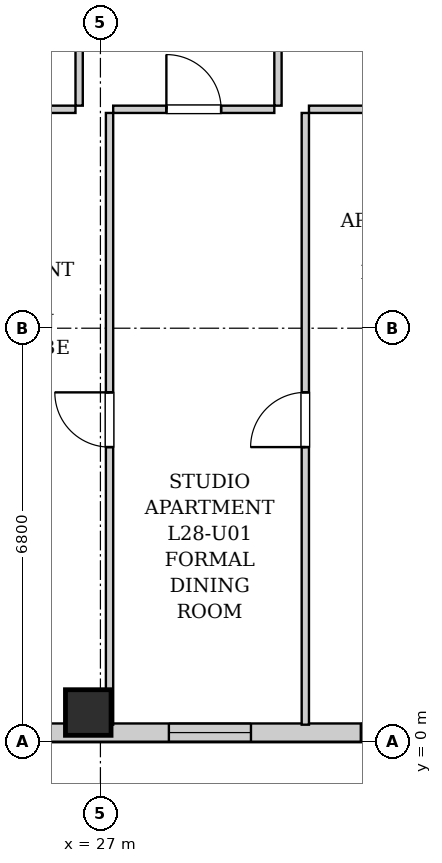
"""IFC4 building model, lengths in metres.
Left out: names, types, materials, properties, quantities, classifications, styles, units other than length and angle.
Written with IfcOpenShell. Run it as: python <this file> out.ifc"""

import sys

from ifc_helpers import new_model, si_unit, direction, frame, frame_2d, origin, origin_2d, place, context, subcontext, project, spatial, rectangle, extrude, element, fill, save


model = new_model("IFC4")
c1 = context("Model", 3, precision=1e-05, world=origin(), true_north=direction((0.0, 1.0)))
c2 = subcontext(c1, "Body", "Model", "MODEL_VIEW")
j1 = project(units=[si_unit("LENGTHUNIT", "METRE"), si_unit("PLANEANGLEUNIT", "RADIAN")], contexts=[c1])
p1 = place(None, origin())
s1 = spatial("IfcSite", under=j1, at=p1, CompositionType="ELEMENT")
p2 = place(p1, origin())
s2 = spatial("IfcBuilding", under=s1, at=p2, CompositionType="ELEMENT")
p3 = place(p2, frame((0.0, 0.0, 100.7)))
s3 = spatial("IfcBuildingStorey", under=s2, at=p3, CompositionType="ELEMENT", Elevation=100.7)
p4 = place(p3, frame((26.8, 0.48, 0.0), z_axis=(0.0, 0.0, 1.0), x_axis=(1.0, 0.0, 0.0)))
e1 = element("IfcColumn", 1, at=p4, inside=s3, PredefinedType="COLUMN", context=c2, shape_type="SweptSolid", body=[
    extrude(rectangle(XDim=0.75, YDim=0.75, at=origin_2d()), origin(), (0.0, 0.0, 1.0), 3.2),
])
p5 = place(p3, frame((40.9, 0.15, 0.0), z_axis=(0.0, 0.0, 1.0), x_axis=(-1.0, 0.0, 0.0)))
e2 = element("IfcWall", 2, at=p5, inside=s3, PredefinedType="SOLIDWALL", context=c2, shape_type="SweptSolid", body=[
    extrude(rectangle(XDim=24.35, YDim=0.3, at=frame_2d((12.175, 0.0))), origin(), (0.0, 0.0, 1.0), 2.94),
])
p6 = place(p5, frame((21.119, 0.0, 0.55)))
e3 = element("IfcOpeningElement", 3, at=p6, cuts=e2, PredefinedType="OPENING", context=c2, shape_type="SweptSolid", body=[
    extrude(rectangle(XDim=1.35, YDim=1.2, at=frame_2d((0.675, 0.6))), frame((0.0, 0.16, 0.0), z_axis=(0.0, -1.0, 0.0), x_axis=(1.0, 0.0, 0.0)), (0.0, 0.0, 1.0), 0.32),
])
p7 = place(p5, frame((18.4, 0.0, 0.55)))
e4 = element("IfcOpeningElement", 4, at=p7, cuts=e2, PredefinedType="OPENING", context=c2, shape_type="SweptSolid", body=[
    extrude(rectangle(XDim=1.35, YDim=1.2, at=frame_2d((0.675, 0.6))), frame((0.0, 0.16, 0.0), z_axis=(0.0, -1.0, 0.0), x_axis=(1.0, 0.0, 0.0)), (0.0, 0.0, 1.0), 0.32),
])
p8 = place(p5, frame((11.424, 0.0, 0.55)))
e5 = element("IfcOpeningElement", 5, at=p8, cuts=e2, PredefinedType="OPENING", context=c2, shape_type="SweptSolid", body=[
    extrude(rectangle(XDim=1.35, YDim=1.2, at=frame_2d((0.675, 0.6))), frame((0.0, 0.16, 0.0), z_axis=(0.0, -1.0, 0.0), x_axis=(1.0, 0.0, 0.0)), (0.0, 0.0, 1.0), 0.32),
])
p9 = place(p5, frame((8.268, 0.0, 0.55)))
e6 = element("IfcOpeningElement", 6, at=p9, cuts=e2, PredefinedType="OPENING", context=c2, shape_type="SweptSolid", body=[
    extrude(rectangle(XDim=1.35, YDim=1.2, at=frame_2d((0.675, 0.6))), frame((0.0, 0.16, 0.0), z_axis=(0.0, -1.0, 0.0), x_axis=(1.0, 0.0, 0.0)), (0.0, 0.0, 1.0), 0.32),
])
p10 = place(p5, frame((5.037, 0.0, 0.55)))
e7 = element("IfcOpeningElement", 7, at=p10, cuts=e2, PredefinedType="OPENING", context=c2, shape_type="SweptSolid", body=[
    extrude(rectangle(XDim=1.35, YDim=1.2, at=frame_2d((0.675, 0.6))), frame((0.0, 0.16, 0.0), z_axis=(0.0, -1.0, 0.0), x_axis=(1.0, 0.0, 0.0)), (0.0, 0.0, 1.0), 0.32),
])
p11 = place(p3, frame((26.65, 10.46, 0.0), z_axis=(0.0, 0.0, 1.0), x_axis=(0.0, 1.0, 0.0)))
e8 = element("IfcWall", 8, at=p11, inside=s3, PredefinedType="PARTITIONING", context=c2, shape_type="SweptSolid", body=[
    extrude(rectangle(XDim=2.85, YDim=0.12, at=frame_2d((1.425, 0.0))), origin(), (0.0, 0.0, 1.0), 2.94),
])
p12 = place(p11, frame((0.975, 0.0, 0.0)))
e9 = element("IfcOpeningElement", 9, at=p12, cuts=e8, PredefinedType="OPENING", context=c2, shape_type="SweptSolid", body=[
    extrude(rectangle(XDim=0.9, YDim=2.05, at=frame_2d((0.45, 1.025))), frame((0.0, 0.07, 0.0), z_axis=(0.0, -1.0, 0.0), x_axis=(1.0, 0.0, 0.0)), (0.0, 0.0, 1.0), 0.14),
])
p13 = place(p3, frame((23.99, 10.4, 0.0), z_axis=(0.0, 0.0, 1.0), x_axis=(1.0, 0.0, 0.0)))
e10 = element("IfcWall", 10, at=p13, inside=s3, PredefinedType="PARTITIONING", context=c2, shape_type="SweptSolid", body=[
    extrude(rectangle(XDim=2.6, YDim=0.12, at=frame_2d((1.3, 0.0))), origin(), (0.0, 0.0, 1.0), 2.94),
])
p14 = place(p13, frame((0.85, 0.0, 0.0)))
e11 = element("IfcOpeningElement", 11, at=p14, cuts=e10, PredefinedType="OPENING", context=c2, shape_type="SweptSolid", body=[
    extrude(rectangle(XDim=0.9, YDim=2.05, at=frame_2d((0.45, 1.025))), frame((0.0, 0.07, 0.0), z_axis=(0.0, -1.0, 0.0), x_axis=(1.0, 0.0, 0.0)), (0.0, 0.0, 1.0), 0.14),
])
p15 = place(p3, frame((29.92, 10.46, 0.0), z_axis=(0.0, 0.0, 1.0), x_axis=(0.0, 1.0, 0.0)))
e12 = element("IfcWall", 12, at=p15, inside=s3, PredefinedType="PARTITIONING", context=c2, shape_type="SweptSolid", body=[
    extrude(rectangle(XDim=2.85, YDim=0.12, at=frame_2d((1.425, 0.0))), origin(), (0.0, 0.0, 1.0), 2.94),
])
p16 = place(p15, frame((0.975, 0.0, 0.0)))
e13 = element("IfcOpeningElement", 13, at=p16, cuts=e12, PredefinedType="OPENING", context=c2, shape_type="SweptSolid", body=[
    extrude(rectangle(XDim=0.9, YDim=2.05, at=frame_2d((0.45, 1.025))), frame((0.0, 0.07, 0.0), z_axis=(0.0, -1.0, 0.0), x_axis=(1.0, 0.0, 0.0)), (0.0, 0.0, 1.0), 0.14),
])
p17 = place(p3, frame((27.21, 10.4, 0.0), z_axis=(0.0, 0.0, 1.0), x_axis=(1.0, 0.0, 0.0)))
e14 = element("IfcWall", 14, at=p17, inside=s3, PredefinedType="PARTITIONING", context=c2, shape_type="SweptSolid", body=[
    extrude(rectangle(XDim=2.65, YDim=0.12, at=frame_2d((1.325, 0.0))), origin(), (0.0, 0.0, 1.0), 2.94),
])
p18 = place(p17, frame((0.875, 0.0, 0.0)))
e15 = element("IfcOpeningElement", 15, at=p18, cuts=e14, PredefinedType="OPENING", context=c2, shape_type="SweptSolid", body=[
    extrude(rectangle(XDim=0.9, YDim=2.05, at=frame_2d((0.45, 1.025))), frame((0.0, 0.07, 0.0), z_axis=(0.0, -1.0, 0.0), x_axis=(1.0, 0.0, 0.0)), (0.0, 0.0, 1.0), 0.14),
])
p19 = place(p3, frame((30.43, 10.4, 0.0), z_axis=(0.0, 0.0, 1.0), x_axis=(1.0, 0.0, 0.0)))
e16 = element("IfcWall", 16, at=p19, inside=s3, PredefinedType="PARTITIONING", context=c2, shape_type="SweptSolid", body=[
    extrude(rectangle(XDim=3.1, YDim=0.12, at=frame_2d((1.55, 0.0))), origin(), (0.0, 0.0, 1.0), 2.94),
])
p20 = place(p19, frame((1.1, 0.0, 0.0)))
e17 = element("IfcOpeningElement", 17, at=p20, cuts=e16, PredefinedType="OPENING", context=c2, shape_type="SweptSolid", body=[
    extrude(rectangle(XDim=0.9, YDim=2.05, at=frame_2d((0.45, 1.025))), frame((0.0, 0.07, 0.0), z_axis=(0.0, -1.0, 0.0), x_axis=(1.0, 0.0, 0.0)), (0.0, 0.0, 1.0), 0.14),
])
p21 = place(p3, frame((27.15, 0.28, 0.0), z_axis=(0.0, 0.0, 1.0), x_axis=(0.0, 1.0, 0.0)))
e18 = element("IfcWall", 18, at=p21, inside=s3, PredefinedType="PARTITIONING", context=c2, shape_type="SweptSolid", body=[
    extrude(rectangle(XDim=10.06, YDim=0.12, at=frame_2d((5.03, 0.0))), origin(), (0.0, 0.0, 1.0), 2.94),
])
p22 = place(p21, frame((4.565, 0.0, 0.0)))
e19 = element("IfcOpeningElement", 19, at=p22, cuts=e18, PredefinedType="OPENING", context=c2, shape_type="SweptSolid", body=[
    extrude(rectangle(XDim=0.9, YDim=2.05, at=frame_2d((0.45, 1.025))), frame((0.0, 0.07, 0.0), z_axis=(0.0, -1.0, 0.0), x_axis=(1.0, 0.0, 0.0)), (0.0, 0.0, 1.0), 0.14),
])
p23 = place(p3, frame((30.37, 0.28, 0.0), z_axis=(0.0, 0.0, 1.0), x_axis=(0.0, 1.0, 0.0)))
e20 = element("IfcWall", 20, at=p23, inside=s3, PredefinedType="PARTITIONING", context=c2, shape_type="SweptSolid", body=[
    extrude(rectangle(XDim=10.06, YDim=0.12, at=frame_2d((5.03, 0.0))), origin(), (0.0, 0.0, 1.0), 2.94),
])
p24 = place(p23, frame((4.565, 0.0, 0.0)))
e21 = element("IfcOpeningElement", 21, at=p24, cuts=e20, PredefinedType="OPENING", context=c2, shape_type="SweptSolid", body=[
    extrude(rectangle(XDim=0.9, YDim=2.05, at=frame_2d((0.45, 1.025))), frame((0.0, 0.07, 0.0), z_axis=(0.0, -1.0, 0.0), x_axis=(1.0, 0.0, 0.0)), (0.0, 0.0, 1.0), 0.14),
])
p25 = place(p18, origin())
e22 = element("IfcDoor", 22, at=p25, inside=s3, OperationType="SINGLE_SWING_LEFT", PredefinedType="DOOR", context=c2, shape_type="SweptSolid", body=[
    extrude(rectangle(XDim=0.9, YDim=2.05, at=frame_2d((0.45, 1.025))), frame((0.0, 0.025, 0.0), z_axis=(0.0, -1.0, 0.0), x_axis=(1.0, 0.0, 0.0)), (0.0, 0.0, 1.0), 0.05),
])
fill(e15, e22)
p26 = place(p22, origin())
e23 = element("IfcDoor", 23, at=p26, inside=s3, OperationType="SINGLE_SWING_RIGHT", PredefinedType="DOOR", context=c2, shape_type="SweptSolid", body=[
    extrude(rectangle(XDim=0.9, YDim=2.05, at=frame_2d((0.45, 1.025))), frame((0.0, 0.025, 0.0), z_axis=(0.0, -1.0, 0.0), x_axis=(1.0, 0.0, 0.0)), (0.0, 0.0, 1.0), 0.05),
])
fill(e19, e23)
p27 = place(p24, origin())
e24 = element("IfcDoor", 24, at=p27, inside=s3, OperationType="SINGLE_SWING_LEFT", PredefinedType="DOOR", context=c2, shape_type="SweptSolid", body=[
    extrude(rectangle(XDim=0.9, YDim=2.05, at=frame_2d((0.45, 1.025))), frame((0.0, 0.025, 0.0), z_axis=(0.0, -1.0, 0.0), x_axis=(1.0, 0.0, 0.0)), (0.0, 0.0, 1.0), 0.05),
])
fill(e21, e24)
p28 = place(p8, origin())
e25 = element("IfcWindow", 25, at=p28, inside=s3, PartitioningType="SINGLE_PANEL", PredefinedType="WINDOW", context=c2, shape_type="SweptSolid", body=[
    extrude(rectangle(XDim=1.35, YDim=1.2, at=frame_2d((0.675, 0.6))), frame((0.0, 0.03, 0.0), z_axis=(0.0, -1.0, 0.0), x_axis=(1.0, 0.0, 0.0)), (0.0, 0.0, 1.0), 0.06),
])
fill(e5, e25)
p29 = place(p9, origin())
e26 = element("IfcWindow", 26, at=p29, inside=s3, PartitioningType="SINGLE_PANEL", PredefinedType="WINDOW", context=c2, shape_type="SweptSolid", body=[
    extrude(rectangle(XDim=1.35, YDim=1.2, at=frame_2d((0.675, 0.6))), frame((0.0, 0.03, 0.0), z_axis=(0.0, -1.0, 0.0), x_axis=(1.0, 0.0, 0.0)), (0.0, 0.0, 1.0), 0.06),
])
fill(e6, e26)
save(model, sys.argv[1])
